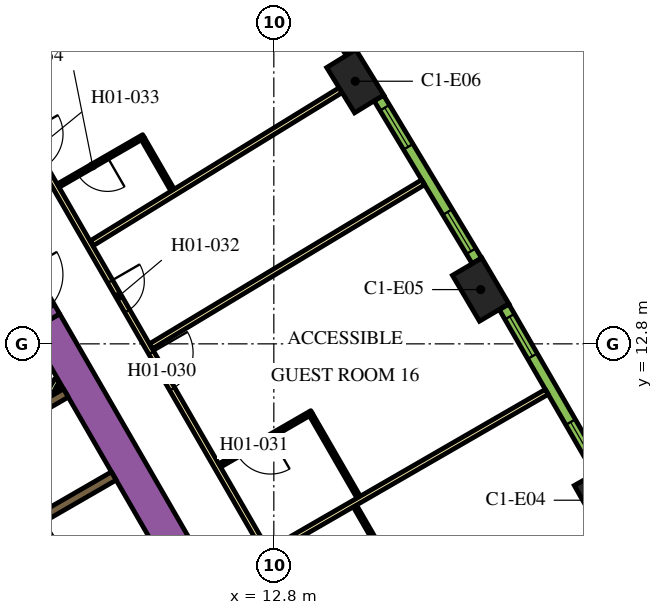
"""IFC4 building model, lengths in metres.
Left out: names, types, materials, properties, quantities, classifications, styles, units other than length and angle.
Written with IfcOpenShell. Run it as: python <this file> out.ifc"""

import sys

from ifc_helpers import new_model, si_unit, direction, frame, frame_2d, origin, origin_2d, place, context, subcontext, project, spatial, rectangle, extrude, element, fill, save


model = new_model("IFC4")
c1 = context("Model", 3, precision=1e-05, world=origin(), true_north=direction((0.0, 1.0)))
c2 = subcontext(c1, "Body", "Model", "MODEL_VIEW")
j1 = project(units=[si_unit("LENGTHUNIT", "METRE"), si_unit("PLANEANGLEUNIT", "RADIAN")], contexts=[c1])
p1 = place(None, origin())
s1 = spatial("IfcSite", under=j1, at=p1, CompositionType="ELEMENT")
p2 = place(p1, origin())
s2 = spatial("IfcBuilding", under=s1, at=p2, CompositionType="ELEMENT")
p3 = place(p2, frame((0.0, 0.0, 27.6)))
s3 = spatial("IfcBuildingStorey", under=s2, at=p3, CompositionType="ELEMENT", Elevation=27.6)
for number, where, z_axis, x_axis in (
    (1, (21.443, 8.685, 0.0), (0.0, 0.0, 1.0), (-0.492, 0.871, 0.0)),
    (2, (18.243, 14.228, 0.0), (0.0, 0.0, 1.0), (-0.508, 0.861, 0.0)),
    (3, (14.942, 19.71, 0.0), (0.0, 0.0, 1.0), (-0.524, 0.852, 0.0)),
):
    element("IfcColumn", number, at=place(p3, frame(where, z_axis=z_axis, x_axis=x_axis)), inside=s3, PredefinedType="COLUMN", context=c2, shape_type="SweptSolid", body=[
        extrude(rectangle(XDim=1.4, YDim=0.9, at=origin_2d()), origin(), (0.0, 0.0, 1.0), 3.9),
    ])
p4 = place(p3, frame((6.776, 13.364, 0.0), z_axis=(0.0, 0.0, 1.0), x_axis=(0.500004177138, -0.8660229921, 0.0)))
e4 = element("IfcWall", 4, at=p4, inside=s3, PredefinedType="SOLIDWALL", context=c2, shape_type="SweptSolid", body=[
    extrude(rectangle(XDim=20.204, YDim=0.9, at=frame_2d((10.102, 0.0))), origin(), (0.0, 0.0, 1.0), 3.9),
])
p5 = place(p3, frame((5.356, 10.367, 0.0), z_axis=(0.0, 0.0, 1.0), x_axis=(0.865978535641, 0.50008116922, 0.0)))
e5 = element("IfcWall", 5, at=p5, inside=s3, PredefinedType="SOLIDWALL", context=c2, shape_type="SweptSolid", body=[
    extrude(rectangle(XDim=2.278, YDim=0.25, at=frame_2d((1.139, 0.0))), origin(), (0.0, 0.0, 1.0), 3.9),
])
p6 = place(p3, frame((6.684, 8.224, 0.0), z_axis=(0.0, 0.0, 1.0), x_axis=(0.86605622881, 0.499946605688, 0.0)))
e6 = element("IfcWall", 6, at=p6, inside=s3, PredefinedType="SOLIDWALL", context=c2, shape_type="SweptSolid", body=[
    extrude(rectangle(XDim=2.2, YDim=0.25, at=frame_2d((1.1, 0.0))), origin(), (0.0, 0.0, 1.0), 3.9),
])
p7 = place(p3, frame((6.872, 11.45, 0.0), z_axis=(0.0, 0.0, 1.0), x_axis=(0.499846793097, 0.866113839764, 0.0)))
e7 = element("IfcWall", 7, at=p7, inside=s3, PredefinedType="PARTITIONING", context=c2, shape_type="SweptSolid", body=[
    extrude(rectangle(XDim=0.453, YDim=0.15, at=frame_2d((0.227, 0.0))), origin(), (0.0, 0.0, 1.0), 2.75),
])
p8 = place(p3, frame((7.131, 11.6, 0.0), z_axis=(0.0, 0.0, 1.0), x_axis=(0.498600033135, 0.866832167699, 0.0)))
e8 = element("IfcWall", 8, at=p8, inside=s3, PredefinedType="PARTITIONING", context=c2, shape_type="SweptSolid", body=[
    extrude(rectangle(XDim=0.107, YDim=0.15, at=frame_2d((0.053, 0.0))), origin(), (0.0, 0.0, 1.0), 2.75),
])
p9 = place(p3, frame((11.553, -0.46, 0.0), z_axis=(0.0, 0.0, 1.0), x_axis=(-0.500006514828, 0.866021642414, 0.0)))
e9 = element("IfcWall", 9, at=p9, inside=s3, PredefinedType="SOLIDWALL", context=c2, shape_type="SweptSolid", body=[
    extrude(rectangle(XDim=12.35, YDim=0.25, at=frame_2d((6.175, 0.0))), origin(), (0.0, 0.0, 1.0), 3.9),
])
p10 = place(p9, frame((0.585, 0.0, 0.0)))
e10 = element("IfcOpeningElement", 10, at=p10, cuts=e9, PredefinedType="OPENING", context=c2, shape_type="SweptSolid", body=[
    extrude(rectangle(XDim=1.1, YDim=2.1, at=frame_2d((0.55, 1.05))), frame((0.0, 0.135, 0.0), z_axis=(0.0, -1.0, 0.0), x_axis=(1.0, 0.0, 0.0)), (0.0, 0.0, 1.0), 0.27),
])
p11 = place(p9, frame((3.105, 0.0, 0.0)))
e11 = element("IfcOpeningElement", 11, at=p11, cuts=e9, PredefinedType="OPENING", context=c2, shape_type="SweptSolid", body=[
    extrude(rectangle(XDim=1.1, YDim=2.1, at=frame_2d((0.55, 1.05))), frame((0.0, 0.135, 0.0), z_axis=(0.0, -1.0, 0.0), x_axis=(1.0, 0.0, 0.0)), (0.0, 0.0, 1.0), 0.27),
])
p12 = place(p9, frame((5.625, 0.0, 0.0)))
e12 = element("IfcOpeningElement", 12, at=p12, cuts=e9, PredefinedType="OPENING", context=c2, shape_type="SweptSolid", body=[
    extrude(rectangle(XDim=1.1, YDim=2.1, at=frame_2d((0.55, 1.05))), frame((0.0, 0.135, 0.0), z_axis=(0.0, -1.0, 0.0), x_axis=(1.0, 0.0, 0.0)), (0.0, 0.0, 1.0), 0.27),
])
p13 = place(p3, frame((8.565, -2.185, 0.0), z_axis=(0.0, 0.0, 1.0), x_axis=(-0.499997954832, 0.866026584559, 0.0)))
e13 = element("IfcWall", 13, at=p13, inside=s3, PredefinedType="SOLIDWALL", context=c2, shape_type="SweptSolid", body=[
    extrude(rectangle(XDim=12.35, YDim=0.25, at=frame_2d((6.175, 0.0))), origin(), (0.0, 0.0, 1.0), 3.9),
])
p14 = place(p13, frame((5.725, 0.0, 0.0)))
e14 = element("IfcOpeningElement", 14, at=p14, cuts=e13, PredefinedType="OPENING", context=c2, shape_type="SweptSolid", body=[
    extrude(rectangle(XDim=0.9, YDim=2.1, at=frame_2d((0.45, 1.05))), frame((0.0, 0.135, 0.0), z_axis=(0.0, -1.0, 0.0), x_axis=(1.0, 0.0, 0.0)), (0.0, 0.0, 1.0), 0.27),
])
p15 = place(p3, frame((5.926, 14.836, 0.0), z_axis=(0.0, 0.0, 1.0), x_axis=(0.500062241894, -0.865989465428, 0.0)))
e15 = element("IfcWall", 15, at=p15, inside=s3, PredefinedType="SOLIDWALL", context=c2, shape_type="SweptSolid", body=[
    extrude(rectangle(XDim=1.7, YDim=0.9, at=frame_2d((0.85, 0.0))), origin(), (0.0, 0.0, 1.0), 3.9),
])
p16 = place(p15, frame((0.25, 0.0, 0.0)))
e16 = element("IfcOpeningElement", 16, at=p16, cuts=e15, PredefinedType="OPENING", context=c2, shape_type="SweptSolid", body=[
    extrude(rectangle(XDim=1.2, YDim=2.1, at=frame_2d((0.6, 1.05))), frame((0.0, 0.46, 0.0), z_axis=(0.0, -1.0, 0.0), x_axis=(1.0, 0.0, 0.0)), (0.0, 0.0, 1.0), 0.92),
])
p17 = place(p3, frame((6.163, 18.475, 0.0), z_axis=(0.0, 0.0, 1.0), x_axis=(0.500001317485, -0.866024643133, 0.0)))
e17 = element("IfcWall", 17, at=p17, inside=s3, PredefinedType="PARTITIONING", context=c2, shape_type="SweptSolid", body=[
    extrude(rectangle(XDim=25.767, YDim=0.15, at=frame_2d((12.883, 0.0))), origin(), (0.0, 0.0, 1.0), 2.75),
])
p18 = place(p17, frame((24.586, 0.0, 0.0)))
e18 = element("IfcOpeningElement", 18, at=p18, cuts=e17, PredefinedType="OPENING", context=c2, shape_type="SweptSolid", body=[
    extrude(rectangle(XDim=1.0, YDim=2.1, at=frame_2d((0.5, 1.05))), frame((0.0, 0.085, 0.0), z_axis=(0.0, -1.0, 0.0), x_axis=(1.0, 0.0, 0.0)), (0.0, 0.0, 1.0), 0.17),
])
p19 = place(p17, frame((19.319, 0.0, 0.0)))
e19 = element("IfcOpeningElement", 19, at=p19, cuts=e17, PredefinedType="OPENING", context=c2, shape_type="SweptSolid", body=[
    extrude(rectangle(XDim=1.0, YDim=2.1, at=frame_2d((0.5, 1.05))), frame((0.0, 0.085, 0.0), z_axis=(0.0, -1.0, 0.0), x_axis=(1.0, 0.0, 0.0)), (0.0, 0.0, 1.0), 0.17),
])
p20 = place(p17, frame((18.012, 0.0, 0.0)))
e20 = element("IfcOpeningElement", 20, at=p20, cuts=e17, PredefinedType="OPENING", context=c2, shape_type="SweptSolid", body=[
    extrude(rectangle(XDim=1.0, YDim=2.1, at=frame_2d((0.5, 1.05))), frame((0.0, 0.085, 0.0), z_axis=(0.0, -1.0, 0.0), x_axis=(1.0, 0.0, 0.0)), (0.0, 0.0, 1.0), 0.17),
])
p21 = place(p17, frame((6.824, 0.0, 0.0)))
e21 = element("IfcOpeningElement", 21, at=p21, cuts=e17, PredefinedType="OPENING", context=c2, shape_type="SweptSolid", body=[
    extrude(rectangle(XDim=1.1, YDim=2.1, at=frame_2d((0.55, 1.05))), frame((0.0, 0.085, 0.0), z_axis=(0.0, -1.0, 0.0), x_axis=(1.0, 0.0, 0.0)), (0.0, 0.0, 1.0), 0.17),
])
p22 = place(p17, frame((4.658, 0.0, 0.0)))
e22 = element("IfcOpeningElement", 22, at=p22, cuts=e17, PredefinedType="OPENING", context=c2, shape_type="SweptSolid", body=[
    extrude(rectangle(XDim=0.9, YDim=2.1, at=frame_2d((0.45, 1.05))), frame((0.0, 0.085, 0.0), z_axis=(0.0, -1.0, 0.0), x_axis=(1.0, 0.0, 0.0)), (0.0, 0.0, 1.0), 0.17),
])
p23 = place(p17, frame((0.18, 0.0, 0.0)))
e23 = element("IfcOpeningElement", 23, at=p23, cuts=e17, PredefinedType="OPENING", context=c2, shape_type="SweptSolid", body=[
    extrude(rectangle(XDim=1.0, YDim=2.1, at=frame_2d((0.5, 1.05))), frame((0.0, 0.085, 0.0), z_axis=(0.0, -1.0, 0.0), x_axis=(1.0, 0.0, 0.0)), (0.0, 0.0, 1.0), 0.17),
])
p24 = place(p3, frame((11.16, 24.888, 0.0), z_axis=(0.0, 0.0, 1.0), x_axis=(-0.84199813156, -0.539480441211, 0.0)))
e24 = element("IfcWall", 24, at=p24, inside=s3, PredefinedType="PARTITIONING", context=c2, shape_type="SweptSolid", body=[
    extrude(rectangle(XDim=11.638, YDim=0.15, at=frame_2d((5.819, 0.0))), origin(), (0.0, 0.0, 1.0), 2.75),
])
p25 = place(p3, frame((14.558, 19.475, 0.0), z_axis=(0.0, 0.0, 1.0), x_axis=(-0.851829455142, -0.523819223925, 0.0)))
e25 = element("IfcWall", 25, at=p25, inside=s3, PredefinedType="PARTITIONING", context=c2, shape_type="SweptSolid", body=[
    extrude(rectangle(XDim=7.688, YDim=0.15, at=frame_2d((3.844, 0.0))), origin(), (0.0, 0.0, 1.0), 2.75),
])
p26 = place(p3, frame((16.729, 17.052, 0.0), z_axis=(0.0, 0.0, 1.0), x_axis=(-0.856630606266, -0.515930232113, 0.0)))
e26 = element("IfcWall", 26, at=p26, inside=s3, PredefinedType="PARTITIONING", context=c2, shape_type="SweptSolid", body=[
    extrude(rectangle(XDim=8.355, YDim=0.15, at=frame_2d((4.178, 0.0))), origin(), (0.0, 0.0, 1.0), 2.75),
])
p27 = place(p3, frame((19.982, 11.537, 0.0), z_axis=(0.0, 0.0, 1.0), x_axis=(-0.866020994654, -0.500007636761, 0.0)))
e27 = element("IfcWall", 27, at=p27, inside=s3, PredefinedType="PARTITIONING", context=c2, shape_type="SweptSolid", body=[
    extrude(rectangle(XDim=8.423, YDim=0.15, at=frame_2d((4.211, 0.0))), origin(), (0.0, 0.0, 1.0), 2.75),
])
p28 = place(p3, frame((15.779, 7.071, 0.0), z_axis=(0.0, 0.0, 1.0), x_axis=(-0.499976720371, 0.866038843867, 0.0)))
e28 = element("IfcWall", 28, at=p28, inside=s3, PredefinedType="PARTITIONING", context=c2, shape_type="SweptSolid", body=[
    extrude(rectangle(XDim=1.69, YDim=0.1, at=frame_2d((0.845, 0.0))), origin(), (0.0, 0.0, 1.0), 2.75),
])
p29 = place(p3, frame((13.799, 10.999, 0.0), z_axis=(0.0, 0.0, 1.0), x_axis=(-0.866034573852, -0.49998411664, 0.0)))
e29 = element("IfcWall", 29, at=p29, inside=s3, PredefinedType="PARTITIONING", context=c2, shape_type="SweptSolid", body=[
    extrude(rectangle(XDim=2.8, YDim=0.1, at=frame_2d((1.4, 0.0))), origin(), (0.0, 0.0, 1.0), 2.75),
])
p30 = place(p29, frame((1.25, 0.0, 0.0)))
e30 = element("IfcOpeningElement", 30, at=p30, cuts=e29, PredefinedType="OPENING", context=c2, shape_type="SweptSolid", body=[
    extrude(rectangle(XDim=1.0, YDim=2.1, at=frame_2d((0.5, 1.05))), frame((0.0, 0.06, 0.0), z_axis=(0.0, -1.0, 0.0), x_axis=(1.0, 0.0, 0.0)), (0.0, 0.0, 1.0), 0.12),
])
p31 = place(p3, frame((13.781, 10.931, 0.0), z_axis=(0.0, 0.0, 1.0), x_axis=(0.500004234368, -0.866022959057, 0.0)))
e31 = element("IfcWall", 31, at=p31, inside=s3, PredefinedType="PARTITIONING", context=c2, shape_type="SweptSolid", body=[
    extrude(rectangle(XDim=2.5, YDim=0.1, at=frame_2d((1.25, 0.0))), origin(), (0.0, 0.0, 1.0), 2.75),
])
p32 = place(p3, frame((9.375, 18.261, 0.0), z_axis=(0.0, 0.0, 1.0), x_axis=(-0.866021400173, -0.500006934395, 0.0)))
e32 = element("IfcWall", 32, at=p32, inside=s3, PredefinedType="PARTITIONING", context=c2, shape_type="SweptSolid", body=[
    extrude(rectangle(XDim=2.6, YDim=0.1, at=frame_2d((1.3, 0.0))), origin(), (0.0, 0.0, 1.0), 2.75),
])
p33 = place(p32, frame((1.1, 0.0, 0.0)))
e33 = element("IfcOpeningElement", 33, at=p33, cuts=e32, PredefinedType="OPENING", context=c2, shape_type="SweptSolid", body=[
    extrude(rectangle(XDim=0.9, YDim=2.1, at=frame_2d((0.45, 1.05))), frame((0.0, 0.06, 0.0), z_axis=(0.0, -1.0, 0.0), x_axis=(1.0, 0.0, 0.0)), (0.0, 0.0, 1.0), 0.12),
])
p34 = place(p3, frame((9.357, 18.193, 0.0), z_axis=(0.0, 0.0, 1.0), x_axis=(0.499899694197, -0.866083307622, 0.0)))
e34 = element("IfcWall", 34, at=p34, inside=s3, PredefinedType="PARTITIONING", context=c2, shape_type="SweptSolid", body=[
    extrude(rectangle(XDim=1.55, YDim=0.1, at=frame_2d((0.775, 0.0))), origin(), (0.0, 0.0, 1.0), 2.75),
])
p35 = place(p3, frame((21.357, 9.445, 0.0), z_axis=(0.0, 0.0, 1.0), x_axis=(-0.50002123722, 0.866013142123, 0.0)))
e35 = element("IfcWall", 35, at=p35, inside=s3, PredefinedType="SOLIDWALL", context=c2, shape_type="SweptSolid", body=[
    extrude(rectangle(XDim=4.998, YDim=0.29, at=frame_2d((2.499, 0.0))), origin(), (0.0, 0.0, 1.0), 3.65),
])
p36 = place(p35, frame((0.297, 0.0, 0.9)))
e36 = element("IfcOpeningElement", 36, at=p36, cuts=e35, PredefinedType="OPENING", context=c2, shape_type="SweptSolid", body=[
    extrude(rectangle(XDim=1.2, YDim=2.15, at=frame_2d((0.6, 1.075))), frame((0.0, 0.155, 0.0), z_axis=(0.0, -1.0, 0.0), x_axis=(1.0, 0.0, 0.0)), (0.0, 0.0, 1.0), 0.31),
])
p37 = place(p35, frame((3.501, 0.0, 0.9)))
e37 = element("IfcOpeningElement", 37, at=p37, cuts=e35, PredefinedType="OPENING", context=c2, shape_type="SweptSolid", body=[
    extrude(rectangle(XDim=1.2, YDim=2.15, at=frame_2d((0.6, 1.075))), frame((0.0, 0.155, 0.0), z_axis=(0.0, -1.0, 0.0), x_axis=(1.0, 0.0, 0.0)), (0.0, 0.0, 1.0), 0.31),
])
p38 = place(p3, frame((18.143, 14.986, 0.0), z_axis=(0.0, 0.0, 1.0), x_axis=(-0.515938796285, 0.856625448191, 0.0)))
e38 = element("IfcWall", 38, at=p38, inside=s3, PredefinedType="SOLIDWALL", context=c2, shape_type="SweptSolid", body=[
    extrude(rectangle(XDim=4.998, YDim=0.29, at=frame_2d((2.499, 0.0))), origin(), (0.0, 0.0, 1.0), 3.65),
])
p39 = place(p38, frame((0.297, 0.0, 0.9)))
e39 = element("IfcOpeningElement", 39, at=p39, cuts=e38, PredefinedType="OPENING", context=c2, shape_type="SweptSolid", body=[
    extrude(rectangle(XDim=1.2, YDim=2.15, at=frame_2d((0.6, 1.075))), frame((0.0, 0.155, 0.0), z_axis=(0.0, -1.0, 0.0), x_axis=(1.0, 0.0, 0.0)), (0.0, 0.0, 1.0), 0.31),
])
p40 = place(p38, frame((3.501, 0.0, 0.9)))
e40 = element("IfcOpeningElement", 40, at=p40, cuts=e38, PredefinedType="OPENING", context=c2, shape_type="SweptSolid", body=[
    extrude(rectangle(XDim=1.2, YDim=2.15, at=frame_2d((0.6, 1.075))), frame((0.0, 0.155, 0.0), z_axis=(0.0, -1.0, 0.0), x_axis=(1.0, 0.0, 0.0)), (0.0, 0.0, 1.0), 0.31),
])
p41 = place(p3, frame((14.827, 20.466, 0.0), z_axis=(0.0, 0.0, 1.0), x_axis=(-0.531688286542, 0.846940119462, 0.0)))
e41 = element("IfcWall", 41, at=p41, inside=s3, PredefinedType="SOLIDWALL", context=c2, shape_type="SweptSolid", body=[
    extrude(rectangle(XDim=4.998, YDim=0.29, at=frame_2d((2.499, 0.0))), origin(), (0.0, 0.0, 1.0), 3.65),
])
p42 = place(p41, frame((0.297, 0.0, 0.9)))
e42 = element("IfcOpeningElement", 42, at=p42, cuts=e41, PredefinedType="OPENING", context=c2, shape_type="SweptSolid", body=[
    extrude(rectangle(XDim=1.2, YDim=2.15, at=frame_2d((0.6, 1.075))), frame((0.0, 0.155, 0.0), z_axis=(0.0, -1.0, 0.0), x_axis=(1.0, 0.0, 0.0)), (0.0, 0.0, 1.0), 0.31),
])
p43 = place(p41, frame((3.501, 0.0, 0.9)))
e43 = element("IfcOpeningElement", 43, at=p43, cuts=e41, PredefinedType="OPENING", context=c2, shape_type="SweptSolid", body=[
    extrude(rectangle(XDim=1.2, YDim=2.15, at=frame_2d((0.6, 1.075))), frame((0.0, 0.155, 0.0), z_axis=(0.0, -1.0, 0.0), x_axis=(1.0, 0.0, 0.0)), (0.0, 0.0, 1.0), 0.31),
])
p44 = place(p21, origin())
e44 = element("IfcDoor", 44, at=p44, inside=s3, OperationType="SINGLE_SWING_LEFT", PredefinedType="DOOR", context=c2, shape_type="SweptSolid", body=[
    extrude(rectangle(XDim=1.1, YDim=2.1, at=frame_2d((0.55, 1.05))), frame((0.0, 0.025, 0.0), z_axis=(0.0, -1.0, 0.0), x_axis=(1.0, 0.0, 0.0)), (0.0, 0.0, 1.0), 0.05),
])
fill(e21, e44)
p45 = place(p30, origin())
e45 = element("IfcDoor", 45, at=p45, inside=s3, OperationType="SINGLE_SWING_LEFT", PredefinedType="DOOR", context=c2, shape_type="SweptSolid", body=[
    extrude(rectangle(XDim=1.0, YDim=2.1, at=frame_2d((0.5, 1.05))), frame((0.0, 0.025, 0.0), z_axis=(0.0, -1.0, 0.0), x_axis=(1.0, 0.0, 0.0)), (0.0, 0.0, 1.0), 0.05),
])
fill(e30, e45)
p46 = place(p22, origin())
e46 = element("IfcDoor", 46, at=p46, inside=s3, OperationType="SINGLE_SWING_LEFT", PredefinedType="DOOR", context=c2, shape_type="SweptSolid", body=[
    extrude(rectangle(XDim=0.9, YDim=2.1, at=frame_2d((0.45, 1.05))), frame((0.0, 0.025, 0.0), z_axis=(0.0, -1.0, 0.0), x_axis=(1.0, 0.0, 0.0)), (0.0, 0.0, 1.0), 0.05),
])
fill(e22, e46)
p47 = place(p33, origin())
e47 = element("IfcDoor", 47, at=p47, inside=s3, OperationType="SINGLE_SWING_RIGHT", PredefinedType="DOOR", context=c2, shape_type="SweptSolid", body=[
    extrude(rectangle(XDim=0.9, YDim=2.1, at=frame_2d((0.45, 1.05))), frame((0.0, 0.025, 0.0), z_axis=(0.0, -1.0, 0.0), x_axis=(1.0, 0.0, 0.0)), (0.0, 0.0, 1.0), 0.05),
])
fill(e33, e47)
p48 = place(p36, origin())
e48 = element("IfcWindow", 48, at=p48, inside=s3, PartitioningType="DOUBLE_PANEL_VERTICAL", PredefinedType="WINDOW", context=c2, shape_type="SweptSolid", body=[
    extrude(rectangle(XDim=1.2, YDim=2.15, at=frame_2d((0.6, 1.075))), frame((0.0, 0.015, 0.0), z_axis=(0.0, -1.0, 0.0), x_axis=(1.0, 0.0, 0.0)), (0.0, 0.0, 1.0), 0.06),
])
fill(e36, e48)
p49 = place(p37, origin())
e49 = element("IfcWindow", 49, at=p49, inside=s3, PartitioningType="DOUBLE_PANEL_VERTICAL", PredefinedType="WINDOW", context=c2, shape_type="SweptSolid", body=[
    extrude(rectangle(XDim=1.2, YDim=2.15, at=frame_2d((0.6, 1.075))), frame((0.0, 0.015, 0.0), z_axis=(0.0, -1.0, 0.0), x_axis=(1.0, 0.0, 0.0)), (0.0, 0.0, 1.0), 0.06),
])
fill(e37, e49)
p50 = place(p39, origin())
e50 = element("IfcWindow", 50, at=p50, inside=s3, PartitioningType="DOUBLE_PANEL_VERTICAL", PredefinedType="WINDOW", context=c2, shape_type="SweptSolid", body=[
    extrude(rectangle(XDim=1.2, YDim=2.15, at=frame_2d((0.6, 1.075))), frame((0.0, 0.015, 0.0), z_axis=(0.0, -1.0, 0.0), x_axis=(1.0, 0.0, 0.0)), (0.0, 0.0, 1.0), 0.06),
])
fill(e39, e50)
p51 = place(p40, origin())
e51 = element("IfcWindow", 51, at=p51, inside=s3, PartitioningType="DOUBLE_PANEL_VERTICAL", PredefinedType="WINDOW", context=c2, shape_type="SweptSolid", body=[
    extrude(rectangle(XDim=1.2, YDim=2.15, at=frame_2d((0.6, 1.075))), frame((0.0, 0.015, 0.0), z_axis=(0.0, -1.0, 0.0), x_axis=(1.0, 0.0, 0.0)), (0.0, 0.0, 1.0), 0.06),
])
fill(e40, e51)
save(model, sys.argv[1])
